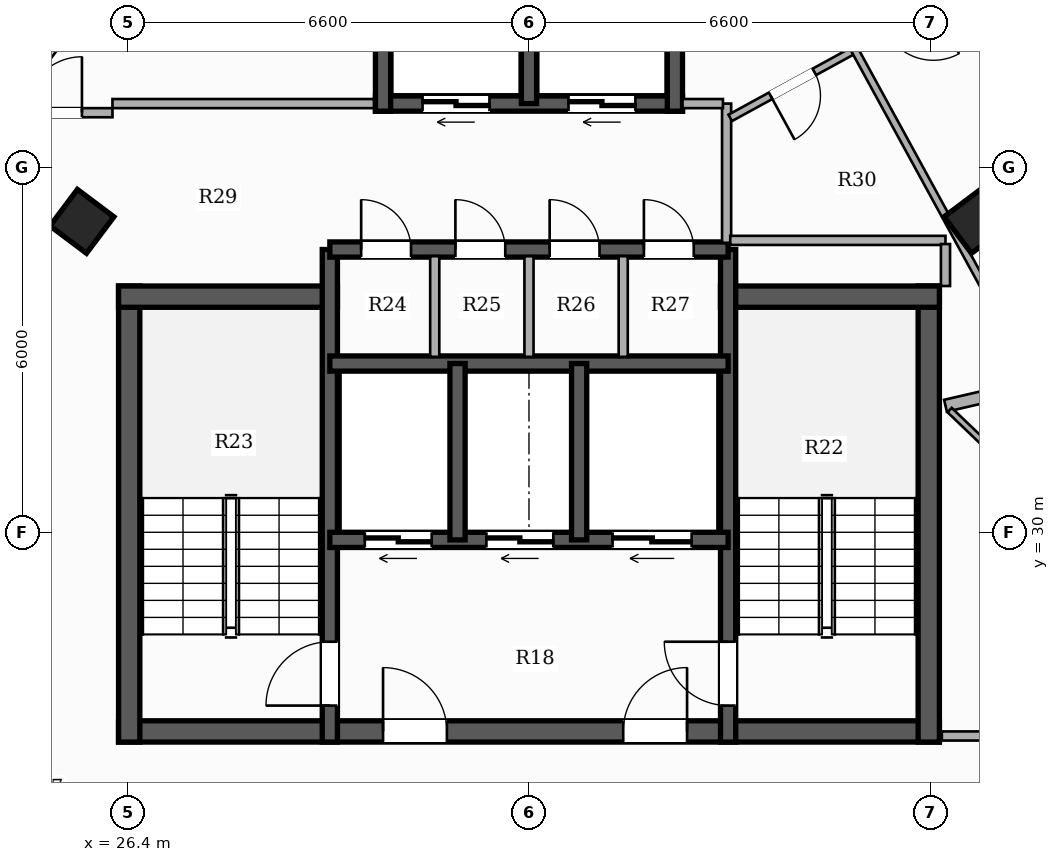
"""IFC4 building model, lengths in metres.
Left out: names, types, materials, properties, quantities, classifications, styles, units other than length and angle.
Written with IfcOpenShell. Run it as: python <this file> out.ifc"""

import sys

from ifc_helpers import new_model, si_unit, direction, frame, frame_2d, origin, origin_2d, place, context, subcontext, project, spatial, rectangle, hollow_rectangle, extrude, element, fill, save


model = new_model("IFC4")
c1 = context("Model", 3, precision=1e-05, world=origin(), true_north=direction((0.0, 1.0)))
c2 = subcontext(c1, "Body", "Model", "MODEL_VIEW")
j1 = project(units=[si_unit("LENGTHUNIT", "METRE"), si_unit("PLANEANGLEUNIT", "RADIAN")], contexts=[c1])
p1 = place(None, origin())
s1 = spatial("IfcSite", under=j1, at=p1, CompositionType="ELEMENT")
p2 = place(p1, origin())
s2 = spatial("IfcBuilding", under=s1, at=p2, CompositionType="ELEMENT")
p3 = place(p2, frame((0.0, 0.0, 219.5)))
s3 = spatial("IfcBuildingStorey", under=s2, at=p3, CompositionType="ELEMENT", Elevation=219.5)
p4 = place(p3, frame((26.25, 26.725, 0.0), z_axis=(0.0, 0.0, 1.0), x_axis=(1.0, 0.0, 0.0)))
e1 = element("IfcWall", 1, at=p4, inside=s3, PredefinedType="SHEAR", context=c2, shape_type="SweptSolid", body=[
    extrude(rectangle(XDim=13.5, YDim=0.35, at=frame_2d((6.75, 0.0))), origin(), (0.0, 0.0, 1.0), 3.3),
])
p5 = place(p4, frame((4.35, 0.0, 0.0)))
e2 = element("IfcOpeningElement", 2, at=p5, cuts=e1, PredefinedType="OPENING", context=c2, shape_type="SweptSolid", body=[
    extrude(rectangle(XDim=1.05, YDim=2.15, at=frame_2d((0.525, 1.075))), frame((0.0, 0.185, 0.0), z_axis=(0.0, -1.0, 0.0), x_axis=(1.0, 0.0, 0.0)), (0.0, 0.0, 1.0), 0.37),
])
p6 = place(p4, frame((8.3, 0.0, 0.0)))
e3 = element("IfcOpeningElement", 3, at=p6, cuts=e1, PredefinedType="OPENING", context=c2, shape_type="SweptSolid", body=[
    extrude(rectangle(XDim=1.05, YDim=2.15, at=frame_2d((0.525, 1.075))), frame((0.0, 0.185, 0.0), z_axis=(0.0, -1.0, 0.0), x_axis=(1.0, 0.0, 0.0)), (0.0, 0.0, 1.0), 0.37),
])
p7 = place(p3, frame((26.425, 26.55, 0.0), z_axis=(0.0, 0.0, 1.0), x_axis=(0.0, 1.0, 0.0)))
e4 = element("IfcWall", 4, at=p7, inside=s3, PredefinedType="SHEAR", context=c2, shape_type="SweptSolid", body=[
    extrude(rectangle(XDim=7.5, YDim=0.35, at=frame_2d((3.75, 0.0))), origin(), (0.0, 0.0, 1.0), 3.3),
])
p8 = place(p3, frame((26.25, 33.875, 0.0), z_axis=(0.0, 0.0, 1.0), x_axis=(1.0, 0.0, 0.0)))
e5 = element("IfcWall", 5, at=p8, inside=s3, PredefinedType="SHEAR", context=c2, shape_type="SweptSolid", body=[
    extrude(rectangle(XDim=3.6, YDim=0.35, at=frame_2d((1.8, 0.0))), origin(), (0.0, 0.0, 1.0), 3.3),
])
p9 = place(p3, frame((39.575, 26.55, 0.0), z_axis=(0.0, 0.0, 1.0), x_axis=(0.0, 1.0, 0.0)))
e6 = element("IfcWall", 6, at=p9, inside=s3, PredefinedType="SHEAR", context=c2, shape_type="SweptSolid", body=[
    extrude(rectangle(XDim=7.5, YDim=0.35, at=frame_2d((3.75, 0.0))), origin(), (0.0, 0.0, 1.0), 3.3),
])
p10 = place(p3, frame((36.15, 33.875, 0.0), z_axis=(0.0, 0.0, 1.0), x_axis=(1.0, 0.0, 0.0)))
e7 = element("IfcWall", 7, at=p10, inside=s3, PredefinedType="SHEAR", context=c2, shape_type="SweptSolid", body=[
    extrude(rectangle(XDim=3.6, YDim=0.35, at=frame_2d((1.8, 0.0))), origin(), (0.0, 0.0, 1.0), 3.3),
])
p11 = place(p3, frame((29.725, 26.55, 0.0), z_axis=(0.0, 0.0, 1.0), x_axis=(0.0, 1.0, 0.0)))
e8 = element("IfcWall", 8, at=p11, inside=s3, PredefinedType="SHEAR", context=c2, shape_type="SweptSolid", body=[
    extrude(rectangle(XDim=8.1, YDim=0.25, at=frame_2d((4.05, 0.0))), origin(), (0.0, 0.0, 1.0), 3.3),
])
p12 = place(p11, frame((0.6, 0.0, 0.0)))
e9 = element("IfcOpeningElement", 9, at=p12, cuts=e8, PredefinedType="OPENING", context=c2, shape_type="SweptSolid", body=[
    extrude(rectangle(XDim=1.05, YDim=2.15, at=frame_2d((0.525, 1.075))), frame((0.0, 0.135, 0.0), z_axis=(0.0, -1.0, 0.0), x_axis=(1.0, 0.0, 0.0)), (0.0, 0.0, 1.0), 0.27),
])
p13 = place(p3, frame((36.275, 26.55, 0.0), z_axis=(0.0, 0.0, 1.0), x_axis=(0.0, 1.0, 0.0)))
e10 = element("IfcWall", 10, at=p13, inside=s3, PredefinedType="SHEAR", context=c2, shape_type="SweptSolid", body=[
    extrude(rectangle(XDim=8.1, YDim=0.25, at=frame_2d((4.05, 0.0))), origin(), (0.0, 0.0, 1.0), 3.3),
])
p14 = place(p13, frame((0.6, 0.0, 0.0)))
e11 = element("IfcOpeningElement", 11, at=p14, cuts=e10, PredefinedType="OPENING", context=c2, shape_type="SweptSolid", body=[
    extrude(rectangle(XDim=1.05, YDim=2.15, at=frame_2d((0.525, 1.075))), frame((0.0, 0.135, 0.0), z_axis=(0.0, -1.0, 0.0), x_axis=(1.0, 0.0, 0.0)), (0.0, 0.0, 1.0), 0.27),
])
p15 = place(p3, frame((36.275, 29.875, 0.0), z_axis=(0.0, 0.0, 1.0), x_axis=(-1.0, 0.0, 0.0)))
e12 = element("IfcWall", 12, at=p15, inside=s3, PredefinedType="SHEAR", context=c2, shape_type="SweptSolid", body=[
    extrude(rectangle(XDim=6.55, YDim=0.25, at=frame_2d((3.275, 0.0))), origin(), (0.0, 0.0, 1.0), 3.3),
])
p16 = place(p15, frame((4.875, 0.0, 0.0)))
e13 = element("IfcOpeningElement", 13, at=p16, cuts=e12, PredefinedType="OPENING", context=c2, shape_type="SweptSolid", body=[
    extrude(rectangle(XDim=1.1, YDim=2.2, at=frame_2d((0.55, 1.1))), frame((0.0, 0.135, 0.0), z_axis=(0.0, -1.0, 0.0), x_axis=(1.0, 0.0, 0.0)), (0.0, 0.0, 1.0), 0.27),
])
p17 = place(p15, frame((2.875, 0.0, 0.0)))
e14 = element("IfcOpeningElement", 14, at=p17, cuts=e12, PredefinedType="OPENING", context=c2, shape_type="SweptSolid", body=[
    extrude(rectangle(XDim=1.1, YDim=2.2, at=frame_2d((0.55, 1.1))), frame((0.0, 0.135, 0.0), z_axis=(0.0, -1.0, 0.0), x_axis=(1.0, 0.0, 0.0)), (0.0, 0.0, 1.0), 0.27),
])
p18 = place(p15, frame((0.6, 0.0, 0.0)))
e15 = element("IfcOpeningElement", 15, at=p18, cuts=e12, PredefinedType="OPENING", context=c2, shape_type="SweptSolid", body=[
    extrude(rectangle(XDim=1.3, YDim=2.2, at=frame_2d((0.65, 1.1))), frame((0.0, 0.135, 0.0), z_axis=(0.0, -1.0, 0.0), x_axis=(1.0, 0.0, 0.0)), (0.0, 0.0, 1.0), 0.27),
])
p19 = place(p3, frame((29.725, 32.775, 0.0), z_axis=(0.0, 0.0, 1.0), x_axis=(1.0, 0.0, 0.0)))
e16 = element("IfcWall", 16, at=p19, inside=s3, PredefinedType="SHEAR", context=c2, shape_type="SweptSolid", body=[
    extrude(rectangle(XDim=6.55, YDim=0.25, at=frame_2d((3.275, 0.0))), origin(), (0.0, 0.0, 1.0), 3.3),
])
for number, where, z_axis, x_axis in (
    (17, (31.825, 29.875, 0.0), (0.0, 0.0, 1.0), (0.0, 1.0, 0.0)),
    (18, (33.825, 29.875, 0.0), (0.0, 0.0, 1.0), (0.0, 1.0, 0.0)),
):
    element("IfcWall", number, at=place(p3, frame(where, z_axis=z_axis, x_axis=x_axis)), inside=s3, PredefinedType="SHEAR", context=c2, shape_type="SweptSolid", body=[
        extrude(rectangle(XDim=2.9, YDim=0.25, at=frame_2d((1.45, 0.0))), origin(), (0.0, 0.0, 1.0), 3.3),
    ])
p20 = place(p3, frame((29.725, 34.65, 0.0), z_axis=(0.0, 0.0, 1.0), x_axis=(1.0, 0.0, 0.0)))
e19 = element("IfcWall", 19, at=p20, inside=s3, PredefinedType="SHEAR", context=c2, shape_type="SweptSolid", body=[
    extrude(rectangle(XDim=6.55, YDim=0.25, at=frame_2d((3.275, 0.0))), origin(), (0.0, 0.0, 1.0), 3.3),
])
p21 = place(p20, frame((0.515, 0.0, 0.0)))
e20 = element("IfcOpeningElement", 20, at=p21, cuts=e19, PredefinedType="OPENING", context=c2, shape_type="SweptSolid", body=[
    extrude(rectangle(XDim=0.82, YDim=2.1, at=frame_2d((0.41, 1.05))), frame((0.0, 0.135, 0.0), z_axis=(0.0, -1.0, 0.0), x_axis=(1.0, 0.0, 0.0)), (0.0, 0.0, 1.0), 0.27),
])
p22 = place(p20, frame((2.065, 0.0, 0.0)))
e21 = element("IfcOpeningElement", 21, at=p22, cuts=e19, PredefinedType="OPENING", context=c2, shape_type="SweptSolid", body=[
    extrude(rectangle(XDim=0.82, YDim=2.1, at=frame_2d((0.41, 1.05))), frame((0.0, 0.135, 0.0), z_axis=(0.0, -1.0, 0.0), x_axis=(1.0, 0.0, 0.0)), (0.0, 0.0, 1.0), 0.27),
])
p23 = place(p20, frame((3.615, 0.0, 0.0)))
e22 = element("IfcOpeningElement", 22, at=p23, cuts=e19, PredefinedType="OPENING", context=c2, shape_type="SweptSolid", body=[
    extrude(rectangle(XDim=0.82, YDim=2.1, at=frame_2d((0.41, 1.05))), frame((0.0, 0.135, 0.0), z_axis=(0.0, -1.0, 0.0), x_axis=(1.0, 0.0, 0.0)), (0.0, 0.0, 1.0), 0.27),
])
p24 = place(p20, frame((5.165, 0.0, 0.0)))
e23 = element("IfcOpeningElement", 23, at=p24, cuts=e19, PredefinedType="OPENING", context=c2, shape_type="SweptSolid", body=[
    extrude(rectangle(XDim=0.82, YDim=2.1, at=frame_2d((0.41, 1.05))), frame((0.0, 0.135, 0.0), z_axis=(0.0, -1.0, 0.0), x_axis=(1.0, 0.0, 0.0)), (0.0, 0.0, 1.0), 0.27),
])
p25 = place(p3, frame((35.525, 37.05, 0.0), z_axis=(0.0, 0.0, 1.0), x_axis=(-1.0, 0.0, 0.0)))
e24 = element("IfcWall", 24, at=p25, inside=s3, PredefinedType="SHEAR", context=c2, shape_type="SweptSolid", body=[
    extrude(rectangle(XDim=5.05, YDim=0.25, at=frame_2d((2.525, 0.0))), origin(), (0.0, 0.0, 1.0), 3.3),
])
p26 = place(p25, frame((3.175, 0.0, 0.0)))
e25 = element("IfcOpeningElement", 25, at=p26, cuts=e24, PredefinedType="OPENING", context=c2, shape_type="SweptSolid", body=[
    extrude(rectangle(XDim=1.1, YDim=2.2, at=frame_2d((0.55, 1.1))), frame((0.0, 0.135, 0.0), z_axis=(0.0, -1.0, 0.0), x_axis=(1.0, 0.0, 0.0)), (0.0, 0.0, 1.0), 0.27),
])
p27 = place(p25, frame((0.775, 0.0, 0.0)))
e26 = element("IfcOpeningElement", 26, at=p27, cuts=e24, PredefinedType="OPENING", context=c2, shape_type="SweptSolid", body=[
    extrude(rectangle(XDim=1.1, YDim=2.2, at=frame_2d((0.55, 1.1))), frame((0.0, 0.135, 0.0), z_axis=(0.0, -1.0, 0.0), x_axis=(1.0, 0.0, 0.0)), (0.0, 0.0, 1.0), 0.27),
])
for number, where, z_axis, x_axis in (
    (27, (30.6, 36.925, 0.0), (0.0, 0.0, 1.0), (0.0, 1.0, 0.0)),
    (28, (35.4, 36.925, 0.0), (0.0, 0.0, 1.0), (0.0, 1.0, 0.0)),
):
    element("IfcWall", number, at=place(p3, frame(where, z_axis=z_axis, x_axis=x_axis)), inside=s3, PredefinedType="SHEAR", context=c2, shape_type="SweptSolid", body=[
        extrude(rectangle(XDim=2.8, YDim=0.25, at=frame_2d((1.4, 0.0))), origin(), (0.0, 0.0, 1.0), 3.3),
    ])
p28 = place(p3, frame((33.0, 37.05, 0.0), z_axis=(0.0, 0.0, 1.0), x_axis=(0.0, 1.0, 0.0)))
e29 = element("IfcWall", 29, at=p28, inside=s3, PredefinedType="SHEAR", context=c2, shape_type="SweptSolid", body=[
    extrude(rectangle(XDim=2.55, YDim=0.25, at=frame_2d((1.275, 0.0))), origin(), (0.0, 0.0, 1.0), 3.3),
])
for number, where, z_axis, x_axis in (
    (30, (25.648, 35.113, 0.0), (0.0, 0.0, 1.0), (0.6, 0.8, 0.0)),
    (31, (40.352, 35.113, 0.0), (0.0, 0.0, 1.0), (-0.6, 0.8, 0.0)),
):
    element("IfcColumn", number, at=place(p3, frame(where, z_axis=z_axis, x_axis=x_axis)), inside=s3, PredefinedType="COLUMN", context=c2, shape_type="SweptSolid", body=[
        extrude(hollow_rectangle(XDim=0.75, YDim=0.75, WallThickness=0.025, at=origin_2d()), origin(), (0.0, 0.0, 1.0), 3.3),
    ])
p29 = place(p3, frame((36.25, 34.76, 0.0), z_axis=(0.0, 0.0, 1.0), x_axis=(0.0, 1.0, 0.0)))
e32 = element("IfcWall", 32, at=p29, inside=s3, PredefinedType="PARTITIONING", context=c2, shape_type="SweptSolid", body=[
    extrude(rectangle(XDim=2.29, YDim=0.15, at=frame_2d((1.145, 0.0))), origin(), (0.0, 0.0, 1.0), 2.425),
])
p30 = place(p3, frame((35.525, 37.05, 0.0), z_axis=(0.0, 0.0, 1.0), x_axis=(1.0, 0.0, 0.0)))
e33 = element("IfcWall", 33, at=p30, inside=s3, PredefinedType="PARTITIONING", context=c2, shape_type="SweptSolid", body=[
    extrude(rectangle(XDim=0.665, YDim=0.15, at=frame_2d((0.333, 0.0))), origin(), (0.0, 0.0, 1.0), 2.425),
])
for number, where, z_axis, x_axis in (
    (34, (31.45, 32.885, 0.0), (0.0, 0.0, 1.0), (0.0, 1.0, 0.0)),
    (35, (33.0, 32.885, 0.0), (0.0, 0.0, 1.0), (0.0, 1.0, 0.0)),
    (36, (34.55, 32.885, 0.0), (0.0, 0.0, 1.0), (0.0, 1.0, 0.0)),
):
    element("IfcWall", number, at=place(p3, frame(where, z_axis=z_axis, x_axis=x_axis)), inside=s3, PredefinedType="PARTITIONING", context=c2, shape_type="SweptSolid", body=[
        extrude(rectangle(XDim=1.655, YDim=0.15, at=frame_2d((0.828, 0.0))), origin(), (0.0, 0.0, 1.0), 3.06),
    ])
p31 = place(p3, frame((24.226, 36.9, 0.0), z_axis=(0.0, 0.0, 1.0), x_axis=(1.0, 0.0, 0.0)))
e37 = element("IfcWall", 37, at=p31, inside=s3, PredefinedType="PARTITIONING", context=c2, shape_type="SweptSolid", body=[
    extrude(rectangle(XDim=1.924, YDim=0.15, at=frame_2d((0.962, 0.0))), origin(), (0.0, 0.0, 1.0), 2.619),
])
p32 = place(p31, frame((0.502, 0.0, 0.0)))
e38 = element("IfcOpeningElement", 38, at=p32, cuts=e37, PredefinedType="OPENING", context=c2, shape_type="SweptSolid", body=[
    extrude(rectangle(XDim=0.92, YDim=2.15, at=frame_2d((0.46, 1.075))), frame((0.0, 0.085, 0.0), z_axis=(0.0, -1.0, 0.0), x_axis=(1.0, 0.0, 0.0)), (0.0, 0.0, 1.0), 0.17),
])
p33 = place(p3, frame((39.79, 26.65, 0.0), z_axis=(0.0, 0.0, 1.0), x_axis=(1.0, 0.0, 0.0)))
e39 = element("IfcWall", 39, at=p33, inside=s3, PredefinedType="PARTITIONING", context=c2, shape_type="SweptSolid", body=[
    extrude(rectangle(XDim=2.46, YDim=0.15, at=frame_2d((1.23, 0.0))), origin(), (0.0, 0.0, 1.0), 2.565),
])
p34 = place(p3, frame((26.15, 37.05, 0.0), z_axis=(0.0, 0.0, 1.0), x_axis=(1.0, 0.0, 0.0)))
e40 = element("IfcWall", 40, at=p34, inside=s3, PredefinedType="PARTITIONING", context=c2, shape_type="SweptSolid", body=[
    extrude(rectangle(XDim=4.3, YDim=0.15, at=frame_2d((2.15, 0.0))), origin(), (0.0, 0.0, 1.0), 2.425),
])
p35 = place(p3, frame((36.31, 34.8, 0.0), z_axis=(0.0, 0.0, 1.0), x_axis=(1.0, 0.0, 0.0)))
e41 = element("IfcWall", 41, at=p35, inside=s3, PredefinedType="PARTITIONING", context=c2, shape_type="SweptSolid", body=[
    extrude(rectangle(XDim=3.54, YDim=0.15, at=frame_2d((1.77, 0.0))), origin(), (0.0, 0.0, 1.0), 2.425),
])
p36 = place(p3, frame((39.85, 34.74, 0.0), z_axis=(0.0, 0.0, 1.0), x_axis=(0.0, -1.0, 0.0)))
e42 = element("IfcWall", 42, at=p36, inside=s3, PredefinedType="PARTITIONING", context=c2, shape_type="SweptSolid", body=[
    extrude(rectangle(XDim=0.69, YDim=0.15, at=frame_2d((0.345, 0.0))), origin(), (0.0, 0.0, 1.0), 2.773),
])
p37 = place(p3, frame((39.85, 32.081, 0.0), z_axis=(0.0, 0.0, 1.0), x_axis=(0.974339670333, 0.225082666628, 0.0)))
e43 = element("IfcWall", 43, at=p37, inside=s3, PredefinedType="PARTITIONING", context=c2, shape_type="SweptSolid", body=[
    extrude(rectangle(XDim=4.714, YDim=0.2, at=frame_2d((2.357, 0.0))), origin(), (0.0, 0.0, 1.0), 2.492),
])
p38 = place(p3, frame((39.918, 32.01, 0.0), z_axis=(0.0, 0.0, 1.0), x_axis=(0.722311203135, -0.691568164266, 0.0)))
e44 = element("IfcWall", 44, at=p38, inside=s3, PredefinedType="PARTITIONING", context=c2, shape_type="SweptSolid", body=[
    extrude(rectangle(XDim=4.876, YDim=0.1, at=frame_2d((2.438, 0.0))), origin(), (0.0, 0.0, 1.0), 2.773),
])
p39 = place(p38, frame((1.998, 0.0, 0.0)))
e45 = element("IfcOpeningElement", 45, at=p39, cuts=e44, PredefinedType="OPENING", context=c2, shape_type="SweptSolid", body=[
    extrude(rectangle(XDim=0.88, YDim=2.1, at=frame_2d((0.44, 1.05))), frame((0.0, 0.06, 0.0), z_axis=(0.0, -1.0, 0.0), x_axis=(1.0, 0.0, 0.0)), (0.0, 0.0, 1.0), 0.12),
])
p40 = place(p3, frame((38.357, 37.934, 0.0), z_axis=(0.0, 0.0, 1.0), x_axis=(-0.877415192217, -0.479731779714, 0.0)))
e46 = element("IfcWall", 46, at=p40, inside=s3, PredefinedType="PARTITIONING", context=c2, shape_type="SweptSolid", body=[
    extrude(rectangle(XDim=2.333, YDim=0.12, at=frame_2d((1.167, 0.0))), origin(), (0.0, 0.0, 1.0), 2.425),
])
p41 = place(p40, frame((0.756, 0.0, 0.0)))
e47 = element("IfcOpeningElement", 47, at=p41, cuts=e46, PredefinedType="OPENING", context=c2, shape_type="SweptSolid", body=[
    extrude(rectangle(XDim=0.82, YDim=2.1, at=frame_2d((0.41, 1.05))), frame((0.0, 0.07, 0.0), z_axis=(0.0, -1.0, 0.0), x_axis=(1.0, 0.0, 0.0)), (0.0, 0.0, 1.0), 0.14),
])
p42 = place(p3, frame((40.172, 38.927, 0.0), z_axis=(0.0, 0.0, 1.0), x_axis=(-0.877322236726, -0.479901753432, 0.0)))
e48 = element("IfcWall", 48, at=p42, inside=s3, PredefinedType="PARTITIONING", context=c2, shape_type="SweptSolid", body=[
    extrude(rectangle(XDim=2.069, YDim=0.12, at=frame_2d((1.035, 0.0))), origin(), (0.0, 0.0, 1.0), 3.06),
])
p43 = place(p42, frame((0.594, 0.0, 0.0)))
e49 = element("IfcOpeningElement", 49, at=p43, cuts=e48, PredefinedType="OPENING", context=c2, shape_type="SweptSolid", body=[
    extrude(rectangle(XDim=0.88, YDim=2.1, at=frame_2d((0.44, 1.05))), frame((0.0, 0.07, 0.0), z_axis=(0.0, -1.0, 0.0), x_axis=(1.0, 0.0, 0.0)), (0.0, 0.0, 1.0), 0.14),
])
p44 = place(p3, frame((38.357, 37.934, 0.0), z_axis=(0.0, 0.0, 1.0), x_axis=(0.479839410825, -0.877356335715, 0.0)))
e50 = element("IfcWall", 50, at=p44, inside=s3, PredefinedType="PARTITIONING", context=c2, shape_type="SweptSolid", body=[
    extrude(rectangle(XDim=6.183, YDim=0.12, at=frame_2d((3.092, 0.0))), origin(), (0.0, 0.0, 1.0), 2.492),
])
p45 = place(p12, origin())
e51 = element("IfcDoor", 51, at=p45, inside=s3, OperationType="SINGLE_SWING_LEFT", PredefinedType="DOOR", context=c2, shape_type="SweptSolid", body=[
    extrude(rectangle(XDim=1.05, YDim=2.15, at=frame_2d((0.525, 1.075))), frame((0.0, 0.025, 0.0), z_axis=(0.0, -1.0, 0.0), x_axis=(1.0, 0.0, 0.0)), (0.0, 0.0, 1.0), 0.05),
])
fill(e9, e51)
p46 = place(p14, origin())
e52 = element("IfcDoor", 52, at=p46, inside=s3, OperationType="SINGLE_SWING_RIGHT", PredefinedType="DOOR", context=c2, shape_type="SweptSolid", body=[
    extrude(rectangle(XDim=1.05, YDim=2.15, at=frame_2d((0.525, 1.075))), frame((0.0, 0.025, 0.0), z_axis=(0.0, -1.0, 0.0), x_axis=(1.0, 0.0, 0.0)), (0.0, 0.0, 1.0), 0.05),
])
fill(e11, e52)
p47 = place(p5, origin())
e53 = element("IfcDoor", 53, at=p47, inside=s3, OperationType="SINGLE_SWING_LEFT", PredefinedType="DOOR", context=c2, shape_type="SweptSolid", body=[
    extrude(rectangle(XDim=1.05, YDim=2.15, at=frame_2d((0.525, 1.075))), frame((0.0, 0.025, 0.0), z_axis=(0.0, -1.0, 0.0), x_axis=(1.0, 0.0, 0.0)), (0.0, 0.0, 1.0), 0.05),
])
fill(e2, e53)
p48 = place(p6, origin())
e54 = element("IfcDoor", 54, at=p48, inside=s3, OperationType="SINGLE_SWING_RIGHT", PredefinedType="DOOR", context=c2, shape_type="SweptSolid", body=[
    extrude(rectangle(XDim=1.05, YDim=2.15, at=frame_2d((0.525, 1.075))), frame((0.0, 0.025, 0.0), z_axis=(0.0, -1.0, 0.0), x_axis=(1.0, 0.0, 0.0)), (0.0, 0.0, 1.0), 0.05),
])
fill(e3, e54)
p49 = place(p16, origin())
e55 = element("IfcDoor", 55, at=p49, inside=s3, OperationType="DOUBLE_DOOR_SLIDING", PredefinedType="DOOR", context=c2, shape_type="SweptSolid", body=[
    extrude(rectangle(XDim=1.1, YDim=2.2, at=frame_2d((0.55, 1.1))), frame((0.0, 0.025, 0.0), z_axis=(0.0, -1.0, 0.0), x_axis=(1.0, 0.0, 0.0)), (0.0, 0.0, 1.0), 0.05),
])
fill(e13, e55)
p50 = place(p17, origin())
e56 = element("IfcDoor", 56, at=p50, inside=s3, OperationType="DOUBLE_DOOR_SLIDING", PredefinedType="DOOR", context=c2, shape_type="SweptSolid", body=[
    extrude(rectangle(XDim=1.1, YDim=2.2, at=frame_2d((0.55, 1.1))), frame((0.0, 0.025, 0.0), z_axis=(0.0, -1.0, 0.0), x_axis=(1.0, 0.0, 0.0)), (0.0, 0.0, 1.0), 0.05),
])
fill(e14, e56)
p51 = place(p18, origin())
e57 = element("IfcDoor", 57, at=p51, inside=s3, OperationType="DOUBLE_DOOR_SLIDING", PredefinedType="DOOR", context=c2, shape_type="SweptSolid", body=[
    extrude(rectangle(XDim=1.3, YDim=2.2, at=frame_2d((0.65, 1.1))), frame((0.0, 0.025, 0.0), z_axis=(0.0, -1.0, 0.0), x_axis=(1.0, 0.0, 0.0)), (0.0, 0.0, 1.0), 0.05),
])
fill(e15, e57)
p52 = place(p26, origin())
e58 = element("IfcDoor", 58, at=p52, inside=s3, OperationType="DOUBLE_DOOR_SLIDING", PredefinedType="DOOR", context=c2, shape_type="SweptSolid", body=[
    extrude(rectangle(XDim=1.1, YDim=2.2, at=frame_2d((0.55, 1.1))), frame((0.0, 0.025, 0.0), z_axis=(0.0, -1.0, 0.0), x_axis=(1.0, 0.0, 0.0)), (0.0, 0.0, 1.0), 0.05),
])
fill(e25, e58)
p53 = place(p27, origin())
e59 = element("IfcDoor", 59, at=p53, inside=s3, OperationType="DOUBLE_DOOR_SLIDING", PredefinedType="DOOR", context=c2, shape_type="SweptSolid", body=[
    extrude(rectangle(XDim=1.1, YDim=2.2, at=frame_2d((0.55, 1.1))), frame((0.0, 0.025, 0.0), z_axis=(0.0, -1.0, 0.0), x_axis=(1.0, 0.0, 0.0)), (0.0, 0.0, 1.0), 0.05),
])
fill(e26, e59)
p54 = place(p21, origin())
e60 = element("IfcDoor", 60, at=p54, inside=s3, OperationType="SINGLE_SWING_LEFT", PredefinedType="DOOR", context=c2, shape_type="SweptSolid", body=[
    extrude(rectangle(XDim=0.82, YDim=2.1, at=frame_2d((0.41, 1.05))), frame((0.0, 0.025, 0.0), z_axis=(0.0, -1.0, 0.0), x_axis=(1.0, 0.0, 0.0)), (0.0, 0.0, 1.0), 0.05),
])
fill(e20, e60)
p55 = place(p22, origin())
e61 = element("IfcDoor", 61, at=p55, inside=s3, OperationType="SINGLE_SWING_LEFT", PredefinedType="DOOR", context=c2, shape_type="SweptSolid", body=[
    extrude(rectangle(XDim=0.82, YDim=2.1, at=frame_2d((0.41, 1.05))), frame((0.0, 0.025, 0.0), z_axis=(0.0, -1.0, 0.0), x_axis=(1.0, 0.0, 0.0)), (0.0, 0.0, 1.0), 0.05),
])
fill(e21, e61)
p56 = place(p23, origin())
e62 = element("IfcDoor", 62, at=p56, inside=s3, OperationType="SINGLE_SWING_LEFT", PredefinedType="DOOR", context=c2, shape_type="SweptSolid", body=[
    extrude(rectangle(XDim=0.82, YDim=2.1, at=frame_2d((0.41, 1.05))), frame((0.0, 0.025, 0.0), z_axis=(0.0, -1.0, 0.0), x_axis=(1.0, 0.0, 0.0)), (0.0, 0.0, 1.0), 0.05),
])
fill(e22, e62)
p57 = place(p24, origin())
e63 = element("IfcDoor", 63, at=p57, inside=s3, OperationType="SINGLE_SWING_LEFT", PredefinedType="DOOR", context=c2, shape_type="SweptSolid", body=[
    extrude(rectangle(XDim=0.82, YDim=2.1, at=frame_2d((0.41, 1.05))), frame((0.0, 0.025, 0.0), z_axis=(0.0, -1.0, 0.0), x_axis=(1.0, 0.0, 0.0)), (0.0, 0.0, 1.0), 0.05),
])
fill(e23, e63)
p58 = place(p32, origin())
e64 = element("IfcDoor", 64, at=p58, inside=s3, OperationType="SINGLE_SWING_RIGHT", PredefinedType="DOOR", context=c2, shape_type="SweptSolid", body=[
    extrude(rectangle(XDim=0.92, YDim=2.15, at=frame_2d((0.46, 1.075))), frame((0.0, 0.025, 0.0), z_axis=(0.0, -1.0, 0.0), x_axis=(1.0, 0.0, 0.0)), (0.0, 0.0, 1.0), 0.05),
])
fill(e38, e64)
p59 = place(p41, origin())
e65 = element("IfcDoor", 65, at=p59, inside=s3, OperationType="SINGLE_SWING_RIGHT", PredefinedType="DOOR", context=c2, shape_type="SweptSolid", body=[
    extrude(rectangle(XDim=0.82, YDim=2.1, at=frame_2d((0.41, 1.05))), frame((0.0, 0.025, 0.0), z_axis=(0.0, -1.0, 0.0), x_axis=(1.0, 0.0, 0.0)), (0.0, 0.0, 1.0), 0.05),
])
fill(e47, e65)
save(model, sys.argv[1])
